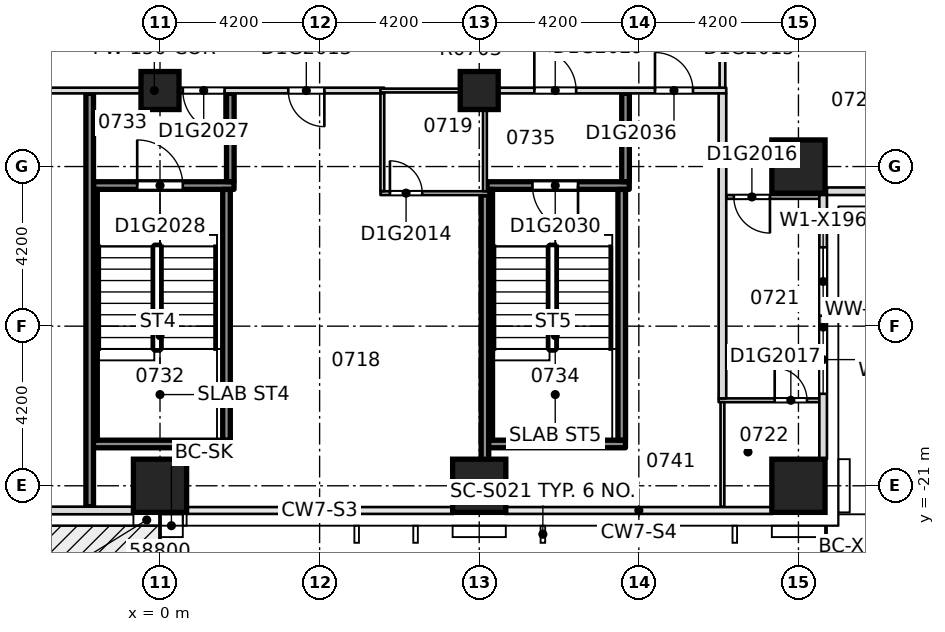
"""IFC4 building model, lengths in metres.
Left out: names, types, materials, properties, quantities, classifications, styles, units other than length and angle.
Written with IfcOpenShell. Run it as: python <this file> out.ifc"""

import sys

from ifc_helpers import new_model, si_unit, direction, frame, frame_2d, origin, origin_2d, place, context, subcontext, project, spatial, rectangle, extrude, element, fill, save


model = new_model("IFC4")
c1 = context("Model", 3, precision=1e-05, world=origin(), true_north=direction((0.0, 1.0)))
c2 = subcontext(c1, "Body", "Model", "MODEL_VIEW")
j1 = project(units=[si_unit("LENGTHUNIT", "METRE"), si_unit("PLANEANGLEUNIT", "RADIAN")], contexts=[c1])
p1 = place(None, origin())
s1 = spatial("IfcSite", under=j1, at=p1, CompositionType="ELEMENT")
p2 = place(p1, origin())
s2 = spatial("IfcBuilding", under=s1, at=p2, CompositionType="ELEMENT")
p3 = place(p2, frame((0.0, 0.0, 37.95)))
s3 = spatial("IfcBuildingStorey", under=s2, at=p3, CompositionType="ELEMENT", Elevation=37.95)
for number, where, z_axis, x_axis in (
    (1, (0.0, -21.0, -0.32), (0.0, 0.0, 1.0), (1.0, 0.0, 0.0)),
    (2, (8.4, -21.0, -0.32), (0.0, 0.0, 1.0), (1.0, 0.0, 0.0)),
    (3, (16.8, -21.0, -0.32), (0.0, 0.0, 1.0), (1.0, 0.0, 0.0)),
    (4, (16.8, -12.6, -0.32), (0.0, 0.0, 1.0), (1.0, 0.0, 0.0)),
):
    element("IfcColumn", number, at=place(p3, frame(where, z_axis=z_axis, x_axis=x_axis)), inside=s3, PredefinedType="COLUMN", context=c2, shape_type="SweptSolid", body=[
        extrude(rectangle(XDim=1.4, YDim=1.4, at=origin_2d()), origin(), (0.0, 0.0, 1.0), 3.45),
    ])
for number, where, z_axis, x_axis in (
    (5, (0.0, -10.6, -0.32), (0.0, 0.0, 1.0), (1.0, 0.0, 0.0)),
    (6, (8.4, -10.6, -0.32), (0.0, 0.0, 1.0), (1.0, 0.0, 0.0)),
):
    element("IfcColumn", number, at=place(p3, frame(where, z_axis=z_axis, x_axis=x_axis)), inside=s3, PredefinedType="COLUMN", context=c2, shape_type="SweptSolid", body=[
        extrude(rectangle(XDim=1.0, YDim=1.0, at=origin_2d()), origin(), (0.0, 0.0, 1.0), 3.45),
    ])
p4 = place(p3, frame((-1.848, -19.9, 0.0), z_axis=(0.0, 0.0, 1.0), x_axis=(1.0, 0.0, 0.0)))
e7 = element("IfcWall", 7, at=p4, inside=s3, PredefinedType="SOLIDWALL", context=c2, shape_type="SweptSolid", body=[
    extrude(rectangle(XDim=3.696, YDim=0.2, at=frame_2d((1.848, 0.0))), origin(), (0.0, 0.0, 1.0), 3.13),
])
p5 = place(p3, frame((8.552, -19.9, 0.0), z_axis=(0.0, 0.0, 1.0), x_axis=(1.0, 0.0, 0.0)))
e8 = element("IfcWall", 8, at=p5, inside=s3, PredefinedType="SOLIDWALL", context=c2, shape_type="SweptSolid", body=[
    extrude(rectangle(XDim=3.696, YDim=0.2, at=frame_2d((1.848, 0.0))), origin(), (0.0, 0.0, 1.0), 3.13),
])
p6 = place(p3, frame((14.7, -18.75, 0.0), z_axis=(0.0, 0.0, 1.0), x_axis=(1.0, 0.0, 0.0)))
e9 = element("IfcWall", 9, at=p6, inside=s3, PredefinedType="PARTITIONING", context=c2, shape_type="SweptSolid", body=[
    extrude(rectangle(XDim=2.65, YDim=0.1, at=frame_2d((1.325, 0.0))), origin(), (0.0, 0.0, 1.0), 3.13),
])
p7 = place(p6, frame((1.475, 0.0, 0.0)))
e10 = element("IfcOpeningElement", 10, at=p7, cuts=e9, PredefinedType="OPENING", context=c2, shape_type="SweptSolid", body=[
    extrude(rectangle(XDim=0.85, YDim=2.1, at=frame_2d((0.425, 1.05))), frame((0.0, 0.06, 0.0), z_axis=(0.0, -1.0, 0.0), x_axis=(1.0, 0.0, 0.0)), (0.0, 0.0, 1.0), 0.12),
])
p8 = place(p3, frame((14.9, -13.4, 0.0), z_axis=(0.0, 0.0, 1.0), x_axis=(1.0, 0.0, 0.0)))
e11 = element("IfcWall", 11, at=p8, inside=s3, PredefinedType="PARTITIONING", context=c2, shape_type="SweptSolid", body=[
    extrude(rectangle(XDim=2.45, YDim=0.1, at=frame_2d((1.225, 0.0))), origin(), (0.0, 0.0, 1.0), 3.13),
])
p9 = place(p8, frame((0.2, 0.0, 0.0)))
e12 = element("IfcOpeningElement", 12, at=p9, cuts=e11, PredefinedType="OPENING", context=c2, shape_type="SweptSolid", body=[
    extrude(rectangle(XDim=0.95, YDim=2.1, at=frame_2d((0.475, 1.05))), frame((0.0, 0.06, 0.0), z_axis=(0.0, -1.0, 0.0), x_axis=(1.0, 0.0, 0.0)), (0.0, 0.0, 1.0), 0.12),
])
p10 = place(p3, frame((5.802, -13.3, 0.0), z_axis=(0.0, 0.0, 1.0), x_axis=(1.0, 0.0, 0.0)))
e13 = element("IfcWall", 13, at=p10, inside=s3, PredefinedType="PARTITIONING", context=c2, shape_type="SweptSolid", body=[
    extrude(rectangle(XDim=2.848, YDim=0.1, at=frame_2d((1.424, 0.0))), origin(), (0.0, 0.0, 1.0), 3.13),
])
p11 = place(p10, frame((0.248, 0.0, 0.0)))
e14 = element("IfcOpeningElement", 14, at=p11, cuts=e13, PredefinedType="OPENING", context=c2, shape_type="SweptSolid", body=[
    extrude(rectangle(XDim=0.85, YDim=2.1, at=frame_2d((0.425, 1.05))), frame((0.0, 0.06, 0.0), z_axis=(0.0, -1.0, 0.0), x_axis=(1.0, 0.0, 0.0)), (0.0, 0.0, 1.0), 0.12),
])
p12 = place(p3, frame((-1.748, -13.1, 0.0), z_axis=(0.0, 0.0, 1.0), x_axis=(1.0, 0.0, 0.0)))
e15 = element("IfcWall", 15, at=p12, inside=s3, PredefinedType="SOLIDWALL", context=c2, shape_type="SweptSolid", body=[
    extrude(rectangle(XDim=3.696, YDim=0.2, at=frame_2d((1.848, 0.0))), origin(), (0.0, 0.0, 1.0), 3.13),
])
p13 = place(p12, frame((1.148, 0.0, 0.0)))
e16 = element("IfcOpeningElement", 16, at=p13, cuts=e15, PredefinedType="OPENING", context=c2, shape_type="SweptSolid", body=[
    extrude(rectangle(XDim=1.2, YDim=2.1, at=frame_2d((0.6, 1.05))), frame((0.0, 0.11, 0.0), z_axis=(0.0, -1.0, 0.0), x_axis=(1.0, 0.0, 0.0)), (0.0, 0.0, 1.0), 0.22),
])
p14 = place(p3, frame((8.602, -13.1, 0.0), z_axis=(0.0, 0.0, 1.0), x_axis=(1.0, 0.0, 0.0)))
e17 = element("IfcWall", 17, at=p14, inside=s3, PredefinedType="SOLIDWALL", context=c2, shape_type="SweptSolid", body=[
    extrude(rectangle(XDim=3.746, YDim=0.2, at=frame_2d((1.873, 0.0))), origin(), (0.0, 0.0, 1.0), 3.13),
])
p15 = place(p14, frame((1.198, 0.0, 0.0)))
e18 = element("IfcOpeningElement", 18, at=p15, cuts=e17, PredefinedType="OPENING", context=c2, shape_type="SweptSolid", body=[
    extrude(rectangle(XDim=1.2, YDim=2.1, at=frame_2d((0.6, 1.05))), frame((0.0, 0.11, 0.0), z_axis=(0.0, -1.0, 0.0), x_axis=(1.0, 0.0, 0.0)), (0.0, 0.0, 1.0), 0.22),
])
p16 = place(p3, frame((-6.2, -10.6, 0.0), z_axis=(0.0, 0.0, 1.0), x_axis=(1.0, 0.0, 0.0)))
e19 = element("IfcWall", 19, at=p16, inside=s3, PredefinedType="PARTITIONING", context=c2, shape_type="SweptSolid", body=[
    extrude(rectangle(XDim=12.1, YDim=0.15, at=frame_2d((6.05, 0.0))), origin(), (0.0, 0.0, 1.0), 3.13),
])
p17 = place(p16, frame((1.725, 0.0, 0.0)))
e20 = element("IfcOpeningElement", 20, at=p17, cuts=e19, PredefinedType="OPENING", context=c2, shape_type="SweptSolid", body=[
    extrude(rectangle(XDim=0.95, YDim=2.1, at=frame_2d((0.475, 1.05))), frame((0.0, 0.085, 0.0), z_axis=(0.0, -1.0, 0.0), x_axis=(1.0, 0.0, 0.0)), (0.0, 0.0, 1.0), 0.17),
])
p18 = place(p16, frame((9.575, 0.0, 0.0)))
e21 = element("IfcOpeningElement", 21, at=p18, cuts=e19, PredefinedType="OPENING", context=c2, shape_type="SweptSolid", body=[
    extrude(rectangle(XDim=0.95, YDim=2.1, at=frame_2d((0.475, 1.05))), frame((0.0, 0.085, 0.0), z_axis=(0.0, -1.0, 0.0), x_axis=(1.0, 0.0, 0.0)), (0.0, 0.0, 1.0), 0.17),
])
p19 = place(p16, frame((6.8, 0.0, 0.0)))
e22 = element("IfcOpeningElement", 22, at=p19, cuts=e19, PredefinedType="OPENING", context=c2, shape_type="SweptSolid", body=[
    extrude(rectangle(XDim=1.1, YDim=2.1, at=frame_2d((0.55, 1.05))), frame((0.0, 0.085, 0.0), z_axis=(0.0, -1.0, 0.0), x_axis=(1.0, 0.0, 0.0)), (0.0, 0.0, 1.0), 0.17),
])
p20 = place(p3, frame((5.8, -10.6, 0.0), z_axis=(0.0, 0.0, 1.0), x_axis=(1.0, 0.0, 0.0)))
e23 = element("IfcWall", 23, at=p20, inside=s3, PredefinedType="PARTITIONING", context=c2, shape_type="SweptSolid", body=[
    extrude(rectangle(XDim=2.8, YDim=0.1, at=frame_2d((1.4, 0.0))), origin(), (0.0, 0.0, 1.0), 3.13),
])
p21 = place(p3, frame((8.5, -10.6, 0.0), z_axis=(0.0, 0.0, 1.0), x_axis=(1.0, 0.0, 0.0)))
e24 = element("IfcWall", 24, at=p21, inside=s3, PredefinedType="PARTITIONING", context=c2, shape_type="SweptSolid", body=[
    extrude(rectangle(XDim=6.4, YDim=0.15, at=frame_2d((3.2, 0.0))), origin(), (0.0, 0.0, 1.0), 3.13),
])
p22 = place(p21, frame((1.35, 0.0, 0.0)))
e25 = element("IfcOpeningElement", 25, at=p22, cuts=e24, PredefinedType="OPENING", context=c2, shape_type="SweptSolid", body=[
    extrude(rectangle(XDim=1.1, YDim=2.1, at=frame_2d((0.55, 1.05))), frame((0.0, 0.085, 0.0), z_axis=(0.0, -1.0, 0.0), x_axis=(1.0, 0.0, 0.0)), (0.0, 0.0, 1.0), 0.17),
])
p23 = place(p21, frame((4.525, 0.0, 0.0)))
e26 = element("IfcOpeningElement", 26, at=p23, cuts=e24, PredefinedType="OPENING", context=c2, shape_type="SweptSolid", body=[
    extrude(rectangle(XDim=1.0, YDim=2.1, at=frame_2d((0.5, 1.05))), frame((0.0, 0.085, 0.0), z_axis=(0.0, -1.0, 0.0), x_axis=(1.0, 0.0, 0.0)), (0.0, 0.0, 1.0), 0.17),
])
for number, where, z_axis, x_axis in (
    (27, (-1.75, -19.798, 0.0), (0.0, 0.0, 1.0), (0.0, 1.0, 0.0)),
    (28, (1.75, -19.798, 0.0), (0.0, 0.0, 1.0), (0.0, 1.0, 0.0)),
):
    element("IfcWall", number, at=place(p3, frame(where, z_axis=z_axis, x_axis=x_axis)), inside=s3, PredefinedType="SOLIDWALL", context=c2, shape_type="SweptSolid", body=[
        extrude(rectangle(XDim=6.596, YDim=0.2, at=frame_2d((3.298, 0.0))), origin(), (0.0, 0.0, 1.0), 3.13),
    ])
p24 = place(p3, frame((1.85, -12.998, 0.0), z_axis=(0.0, 0.0, 1.0), x_axis=(0.0, 1.0, 0.0)))
e29 = element("IfcWall", 29, at=p24, inside=s3, PredefinedType="SOLIDWALL", context=c2, shape_type="SweptSolid", body=[
    extrude(rectangle(XDim=2.323, YDim=0.2, at=frame_2d((1.162, 0.0))), origin(), (0.0, 0.0, 1.0), 3.13),
])
p25 = place(p3, frame((5.85, -13.248, 0.0), z_axis=(0.0, 0.0, 1.0), x_axis=(0.0, 1.0, 0.0)))
e30 = element("IfcWall", 30, at=p25, inside=s3, PredefinedType="PARTITIONING", context=c2, shape_type="SweptSolid", body=[
    extrude(rectangle(XDim=2.573, YDim=0.1, at=frame_2d((1.287, 0.0))), origin(), (0.0, 0.0, 1.0), 3.13),
])
p26 = place(p3, frame((8.55, -13.25, 0.0), z_axis=(0.0, 0.0, 1.0), x_axis=(0.0, 1.0, 0.0)))
e31 = element("IfcWall", 31, at=p26, inside=s3, PredefinedType="PARTITIONING", context=c2, shape_type="SweptSolid", body=[
    extrude(rectangle(XDim=2.575, YDim=0.1, at=frame_2d((1.288, 0.0))), origin(), (0.0, 0.0, 1.0), 3.13),
])
for number, where, z_axis, x_axis in (
    (32, (8.65, -19.798, 0.0), (0.0, 0.0, 1.0), (0.0, 1.0, 0.0)),
    (33, (12.15, -19.798, 0.0), (0.0, 0.0, 1.0), (0.0, 1.0, 0.0)),
):
    element("IfcWall", number, at=place(p3, frame(where, z_axis=z_axis, x_axis=x_axis)), inside=s3, PredefinedType="SOLIDWALL", context=c2, shape_type="SweptSolid", body=[
        extrude(rectangle(XDim=6.596, YDim=0.2, at=frame_2d((3.298, 0.0))), origin(), (0.0, 0.0, 1.0), 3.13),
    ])
p27 = place(p3, frame((12.25, -12.998, 0.0), z_axis=(0.0, 0.0, 1.0), x_axis=(0.0, 1.0, 0.0)))
e34 = element("IfcWall", 34, at=p27, inside=s3, PredefinedType="SOLIDWALL", context=c2, shape_type="SweptSolid", body=[
    extrude(rectangle(XDim=2.323, YDim=0.2, at=frame_2d((1.162, 0.0))), origin(), (0.0, 0.0, 1.0), 3.13),
])
p28 = place(p3, frame((14.8, -21.55, 0.0), z_axis=(0.0, 0.0, 1.0), x_axis=(0.0, 1.0, 0.0)))
e35 = element("IfcWall", 35, at=p28, inside=s3, PredefinedType="PARTITIONING", context=c2, shape_type="SweptSolid", body=[
    extrude(rectangle(XDim=2.75, YDim=0.1, at=frame_2d((1.375, 0.0))), origin(), (0.0, 0.0, 1.0), 3.13),
])
p29 = place(p3, frame((14.8, -18.7, 0.0), z_axis=(0.0, 0.0, 1.0), x_axis=(0.0, 1.0, 0.0)))
e36 = element("IfcWall", 36, at=p29, inside=s3, PredefinedType="PARTITIONING", context=c2, shape_type="SweptSolid", body=[
    extrude(rectangle(XDim=8.025, YDim=0.2, at=frame_2d((4.012, 0.0))), origin(), (0.0, 0.0, 1.0), 3.13),
])
p30 = place(p3, frame((14.8, -10.525, 0.0), z_axis=(0.0, 0.0, 1.0), x_axis=(0.0, 1.0, 0.0)))
e37 = element("IfcWall", 37, at=p30, inside=s3, PredefinedType="PARTITIONING", context=c2, shape_type="SweptSolid", body=[
    extrude(rectangle(XDim=2.05, YDim=0.15, at=frame_2d((1.025, 0.0))), origin(), (0.0, 0.0, 1.0), 3.13),
])
p31 = place(p3, frame((-7.7, -21.65, 0.0), z_axis=(0.0, 0.0, 1.0), x_axis=(1.0, 0.0, 0.0)))
e38 = element("IfcWall", 38, at=p31, inside=s3, PredefinedType="STANDARD", context=c2, shape_type="SweptSolid", body=[
    extrude(rectangle(XDim=7.0, YDim=0.2, at=frame_2d((3.5, 0.0))), origin(), (0.0, 0.0, 1.0), 3.13),
])
p32 = place(p31, frame((0.3, 0.0, 0.2)))
e39 = element("IfcOpeningElement", 39, at=p32, cuts=e38, PredefinedType="OPENING", context=c2, shape_type="SweptSolid", body=[
    extrude(rectangle(XDim=1.8, YDim=2.65, at=frame_2d((0.9, 1.325))), frame((0.0, 0.11, 0.0), z_axis=(0.0, -1.0, 0.0), x_axis=(1.0, 0.0, 0.0)), (0.0, 0.0, 1.0), 0.22),
])
p33 = place(p31, frame((2.2, 0.0, 0.0)))
e40 = element("IfcOpeningElement", 40, at=p33, cuts=e38, PredefinedType="OPENING", context=c2, shape_type="SweptSolid", body=[
    extrude(rectangle(XDim=1.0, YDim=2.4, at=frame_2d((0.5, 1.2))), frame((0.0, 0.11, 0.0), z_axis=(0.0, -1.0, 0.0), x_axis=(1.0, 0.0, 0.0)), (0.0, 0.0, 1.0), 0.22),
])
p34 = place(p3, frame((17.45, -20.3, 0.0), z_axis=(0.0, 0.0, 1.0), x_axis=(0.0, 1.0, 0.0)))
e41 = element("IfcWall", 41, at=p34, inside=s3, PredefinedType="STANDARD", context=c2, shape_type="SweptSolid", body=[
    extrude(rectangle(XDim=6.95, YDim=0.2, at=frame_2d((3.475, 0.0))), origin(), (0.0, 0.0, 1.0), 3.13),
])
p35 = place(p34, frame((1.72, 0.0, 0.2)))
e42 = element("IfcOpeningElement", 42, at=p35, cuts=e41, PredefinedType="OPENING", context=c2, shape_type="SweptSolid", body=[
    extrude(rectangle(XDim=1.8, YDim=2.65, at=frame_2d((0.9, 1.325))), frame((0.0, 0.11, 0.0), z_axis=(0.0, -1.0, 0.0), x_axis=(1.0, 0.0, 0.0)), (0.0, 0.0, 1.0), 0.22),
])
p36 = place(p34, frame((3.775, 0.0, 0.2)))
e43 = element("IfcOpeningElement", 43, at=p36, cuts=e41, PredefinedType="OPENING", context=c2, shape_type="SweptSolid", body=[
    extrude(rectangle(XDim=1.8, YDim=2.65, at=frame_2d((0.9, 1.325))), frame((0.0, 0.11, 0.0), z_axis=(0.0, -1.0, 0.0), x_axis=(1.0, 0.0, 0.0)), (0.0, 0.0, 1.0), 0.22),
])
p37 = place(p3, frame((17.55, -13.25, 0.0), z_axis=(0.0, 0.0, 1.0), x_axis=(1.0, 0.0, 0.0)))
e44 = element("IfcWall", 44, at=p37, inside=s3, PredefinedType="STANDARD", context=c2, shape_type="SweptSolid", body=[
    extrude(rectangle(XDim=6.95, YDim=0.2, at=frame_2d((3.475, 0.0))), origin(), (0.0, 0.0, 1.0), 3.13),
])
p38 = place(p3, frame((8.55, -21.55, 0.0), z_axis=(0.0, 0.0, 1.0), x_axis=(0.0, 1.0, 0.0)))
e45 = element("IfcWall", 45, at=p38, inside=s3, PredefinedType="SOLIDWALL", context=c2, shape_type="SweptSolid", body=[
    extrude(rectangle(XDim=8.2, YDim=0.2, at=frame_2d((4.1, 0.0))), origin(), (0.0, 0.0, 1.0), 3.13),
])
p39 = place(p3, frame((-1.85, -21.55, 0.0), z_axis=(0.0, 0.0, 1.0), x_axis=(0.0, 1.0, 0.0)))
e46 = element("IfcWall", 46, at=p39, inside=s3, PredefinedType="SOLIDWALL", context=c2, shape_type="SweptSolid", body=[
    extrude(rectangle(XDim=10.875, YDim=0.2, at=frame_2d((5.438, 0.0))), origin(), (0.0, 0.0, 1.0), 3.13),
])
p40 = place(p18, origin())
e47 = element("IfcDoor", 47, at=p40, inside=s3, OperationType="SINGLE_SWING_RIGHT", PredefinedType="DOOR", context=c2, shape_type="SweptSolid", body=[
    extrude(rectangle(XDim=0.95, YDim=2.1, at=frame_2d((0.475, 1.05))), frame((0.0, 0.025, 0.0), z_axis=(0.0, -1.0, 0.0), x_axis=(1.0, 0.0, 0.0)), (0.0, 0.0, 1.0), 0.05),
])
fill(e21, e47)
p41 = place(p11, origin())
e48 = element("IfcDoor", 48, at=p41, inside=s3, OperationType="SINGLE_SWING_LEFT", PredefinedType="DOOR", context=c2, shape_type="SweptSolid", body=[
    extrude(rectangle(XDim=0.85, YDim=2.1, at=frame_2d((0.425, 1.05))), frame((0.0, 0.025, 0.0), z_axis=(0.0, -1.0, 0.0), x_axis=(1.0, 0.0, 0.0)), (0.0, 0.0, 1.0), 0.05),
])
fill(e14, e48)
p42 = place(p9, origin())
e49 = element("IfcDoor", 49, at=p42, inside=s3, OperationType="SINGLE_SWING_RIGHT", PredefinedType="DOOR", context=c2, shape_type="SweptSolid", body=[
    extrude(rectangle(XDim=0.95, YDim=2.1, at=frame_2d((0.475, 1.05))), frame((0.0, 0.025, 0.0), z_axis=(0.0, -1.0, 0.0), x_axis=(1.0, 0.0, 0.0)), (0.0, 0.0, 1.0), 0.05),
])
fill(e12, e49)
p43 = place(p7, origin())
e50 = element("IfcDoor", 50, at=p43, inside=s3, OperationType="SINGLE_SWING_LEFT", PredefinedType="DOOR", context=c2, shape_type="SweptSolid", body=[
    extrude(rectangle(XDim=0.85, YDim=2.1, at=frame_2d((0.425, 1.05))), frame((0.0, 0.025, 0.0), z_axis=(0.0, -1.0, 0.0), x_axis=(1.0, 0.0, 0.0)), (0.0, 0.0, 1.0), 0.05),
])
fill(e10, e50)
p44 = place(p19, origin())
e51 = element("IfcDoor", 51, at=p44, inside=s3, OperationType="SINGLE_SWING_RIGHT", PredefinedType="DOOR", context=c2, shape_type="SweptSolid", body=[
    extrude(rectangle(XDim=1.1, YDim=2.1, at=frame_2d((0.55, 1.05))), frame((0.0, 0.025, 0.0), z_axis=(0.0, -1.0, 0.0), x_axis=(1.0, 0.0, 0.0)), (0.0, 0.0, 1.0), 0.05),
])
fill(e22, e51)
p45 = place(p13, origin())
e52 = element("IfcDoor", 52, at=p45, inside=s3, OperationType="SINGLE_SWING_RIGHT", PredefinedType="DOOR", context=c2, shape_type="SweptSolid", body=[
    extrude(rectangle(XDim=1.2, YDim=2.1, at=frame_2d((0.6, 1.05))), frame((0.0, 0.025, 0.0), z_axis=(0.0, -1.0, 0.0), x_axis=(1.0, 0.0, 0.0)), (0.0, 0.0, 1.0), 0.05),
])
fill(e16, e52)
p46 = place(p22, origin())
e53 = element("IfcDoor", 53, at=p46, inside=s3, OperationType="SINGLE_SWING_RIGHT", PredefinedType="DOOR", context=c2, shape_type="SweptSolid", body=[
    extrude(rectangle(XDim=1.1, YDim=2.1, at=frame_2d((0.55, 1.05))), frame((0.0, 0.025, 0.0), z_axis=(0.0, -1.0, 0.0), x_axis=(1.0, 0.0, 0.0)), (0.0, 0.0, 1.0), 0.05),
])
fill(e25, e53)
p47 = place(p15, origin())
e54 = element("IfcDoor", 54, at=p47, inside=s3, OperationType="SINGLE_SWING_RIGHT", PredefinedType="DOOR", context=c2, shape_type="SweptSolid", body=[
    extrude(rectangle(XDim=1.2, YDim=2.1, at=frame_2d((0.6, 1.05))), frame((0.0, 0.025, 0.0), z_axis=(0.0, -1.0, 0.0), x_axis=(1.0, 0.0, 0.0)), (0.0, 0.0, 1.0), 0.05),
])
fill(e18, e54)
p48 = place(p23, origin())
e55 = element("IfcDoor", 55, at=p48, inside=s3, OperationType="SINGLE_SWING_RIGHT", PredefinedType="DOOR", context=c2, shape_type="SweptSolid", body=[
    extrude(rectangle(XDim=1.0, YDim=2.1, at=frame_2d((0.5, 1.05))), frame((0.0, 0.025, 0.0), z_axis=(0.0, -1.0, 0.0), x_axis=(1.0, 0.0, 0.0)), (0.0, 0.0, 1.0), 0.05),
])
fill(e26, e55)
p49 = place(p35, origin())
e56 = element("IfcWindow", 56, at=p49, inside=s3, PartitioningType="SINGLE_PANEL", PredefinedType="WINDOW", context=c2, shape_type="SweptSolid", body=[
    extrude(rectangle(XDim=1.8, YDim=2.65, at=frame_2d((0.9, 1.325))), frame((0.0, 0.03, 0.0), z_axis=(0.0, -1.0, 0.0), x_axis=(1.0, 0.0, 0.0)), (0.0, 0.0, 1.0), 0.06),
])
fill(e42, e56)
p50 = place(p36, origin())
e57 = element("IfcWindow", 57, at=p50, inside=s3, PartitioningType="SINGLE_PANEL", PredefinedType="WINDOW", context=c2, shape_type="SweptSolid", body=[
    extrude(rectangle(XDim=1.8, YDim=2.65, at=frame_2d((0.9, 1.325))), frame((0.0, 0.03, 0.0), z_axis=(0.0, -1.0, 0.0), x_axis=(1.0, 0.0, 0.0)), (0.0, 0.0, 1.0), 0.06),
])
fill(e43, e57)
save(model, sys.argv[1])
